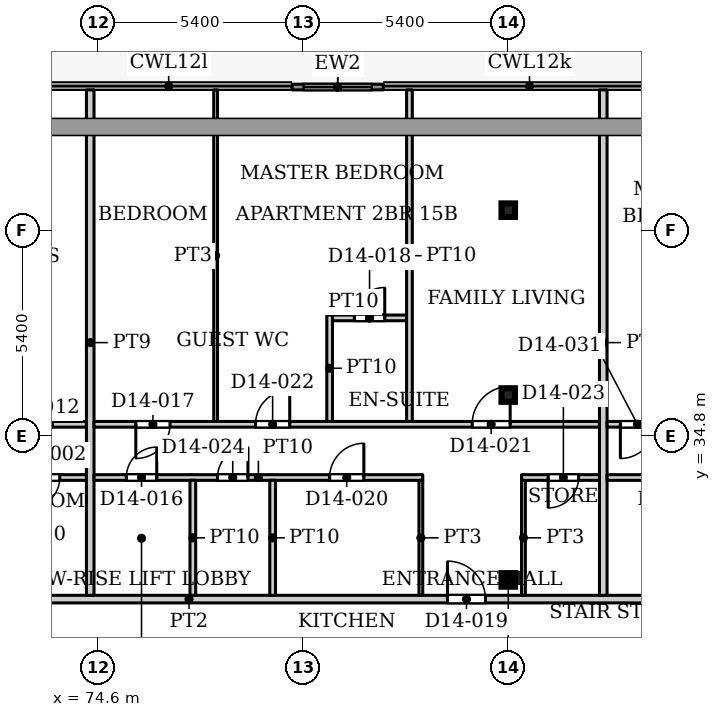
"""IFC4 building model, lengths in metres.
Left out: names, types, materials, properties, quantities, classifications, styles, units other than length and angle.
Written with IfcOpenShell. Run it as: python <this file> out.ifc"""

import sys

from ifc_helpers import new_model, si_unit, direction, frame, frame_2d, origin, origin_2d, place, context, subcontext, project, spatial, rectangle, hollow_rectangle, extrude, source, transform, mapped, element, fill, save


model = new_model("IFC4")
c1 = context("Model", 3, precision=1e-05, world=origin(), true_north=direction((0.0, 1.0)))
c2 = subcontext(c1, "Body", "Model", "MODEL_VIEW")
j1 = project(units=[si_unit("LENGTHUNIT", "METRE"), si_unit("PLANEANGLEUNIT", "RADIAN")], contexts=[c1])
p1 = place(None, origin())
s1 = spatial("IfcSite", under=j1, at=p1, CompositionType="ELEMENT")
p2 = place(p1, origin())
s2 = spatial("IfcBuilding", under=s1, at=p2, CompositionType="ELEMENT")
p3 = place(p2, frame((0.0, 0.0, 65.6)))
s3 = spatial("IfcBuildingStorey", under=s2, at=p3, CompositionType="ELEMENT", Elevation=65.6)
for number, where, z_axis, x_axis in (
    (1, (85.4, 31.005, 0.0), (0.0, 0.0, 1.0), (1.0, 0.0, 0.0)),
    (2, (85.4, 35.87, 0.0), (0.0, 0.0, 1.0), (1.0, 0.0, 0.0)),
    (3, (85.4, 40.735, 0.0), (0.0, 0.0, 1.0), (1.0, 0.0, 0.0)),
):
    element("IfcColumn", number, at=place(p3, frame(where, z_axis=z_axis, x_axis=x_axis)), inside=s3, PredefinedType="COLUMN", context=c2, shape_type="SweptSolid", body=[
        extrude(hollow_rectangle(XDim=0.356, YDim=0.356, WallThickness=0.016, InnerFilletRadius=0.016, OuterFilletRadius=0.032, at=origin_2d()), origin(), (0.0, 0.0, 1.0), 3.9),
    ])
p4 = place(p3, frame((79.712, 43.975, 0.0), z_axis=(0.0, 0.0, 1.0), x_axis=(1.0, 0.0, 0.0)))
e4 = element("IfcWall", 4, at=p4, inside=s3, PredefinedType="SOLIDWALL", context=c2, shape_type="SweptSolid", body=[
    extrude(rectangle(XDim=2.4, YDim=0.15, at=frame_2d((1.2, 0.0))), origin(), (0.0, 0.0, 1.0), 3.75),
])
p5 = place(p4, frame((0.3, 0.0, 0.0)))
e5 = element("IfcOpeningElement", 5, at=p5, cuts=e4, PredefinedType="OPENING", context=c2, shape_type="SweptSolid", body=[
    extrude(rectangle(XDim=1.8, YDim=2.4, at=frame_2d((0.9, 1.2))), frame((0.0, 0.085, 0.0), z_axis=(0.0, -1.0, 0.0), x_axis=(1.0, 0.0, 0.0)), (0.0, 0.0, 1.0), 0.17),
])
p6 = place(p3, frame((55.9, 30.5, 0.0), z_axis=(0.0, 0.0, 1.0), x_axis=(1.0, 0.0, 0.0)))
e6 = element("IfcWall", 6, at=p6, inside=s3, PredefinedType="PARTITIONING", context=c2, shape_type="SweptSolid", body=[
    extrude(rectangle(XDim=42.2, YDim=0.2, at=frame_2d((21.1, 0.0))), origin(), (0.0, 0.0, 1.0), 3.6),
])
p7 = place(p6, frame((14.7, 0.0, 0.0)))
e7 = element("IfcOpeningElement", 7, at=p7, cuts=e6, PredefinedType="OPENING", context=c2, shape_type="SweptSolid", body=[
    extrude(rectangle(XDim=1.0, YDim=2.1, at=frame_2d((0.5, 1.05))), frame((0.0, 0.11, 0.0), z_axis=(0.0, -1.0, 0.0), x_axis=(1.0, 0.0, 0.0)), (0.0, 0.0, 1.0), 0.22),
])
p8 = place(p6, frame((27.9, 0.0, 0.0)))
e8 = element("IfcOpeningElement", 8, at=p8, cuts=e6, PredefinedType="OPENING", context=c2, shape_type="SweptSolid", body=[
    extrude(rectangle(XDim=1.0, YDim=2.1, at=frame_2d((0.5, 1.05))), frame((0.0, 0.11, 0.0), z_axis=(0.0, -1.0, 0.0), x_axis=(1.0, 0.0, 0.0)), (0.0, 0.0, 1.0), 0.22),
])
p9 = place(p6, frame((39.0, 0.0, 0.0)))
e9 = element("IfcOpeningElement", 9, at=p9, cuts=e6, PredefinedType="OPENING", context=c2, shape_type="SweptSolid", body=[
    extrude(rectangle(XDim=1.0, YDim=2.1, at=frame_2d((0.5, 1.05))), frame((0.0, 0.11, 0.0), z_axis=(0.0, -1.0, 0.0), x_axis=(1.0, 0.0, 0.0)), (0.0, 0.0, 1.0), 0.22),
])
p10 = place(p3, frame((55.9, 35.1, 0.0), z_axis=(0.0, 0.0, 1.0), x_axis=(1.0, 0.0, 0.0)))
e10 = element("IfcWall", 10, at=p10, inside=s3, PredefinedType="PARTITIONING", context=c2, shape_type="SweptSolid", body=[
    extrude(rectangle(XDim=18.4, YDim=0.15, at=frame_2d((9.2, 0.0))), origin(), (0.0, 0.0, 1.0), 3.6),
])
p11 = place(p10, frame((1.25, 0.0, 0.0)))
e11 = element("IfcOpeningElement", 11, at=p11, cuts=e10, PredefinedType="OPENING", context=c2, shape_type="SweptSolid", body=[
    extrude(rectangle(XDim=0.9, YDim=2.1, at=frame_2d((0.45, 1.05))), frame((0.0, 0.085, 0.0), z_axis=(0.0, -1.0, 0.0), x_axis=(1.0, 0.0, 0.0)), (0.0, 0.0, 1.0), 0.17),
])
p12 = place(p10, frame((9.2, 0.0, 0.0)))
e12 = element("IfcOpeningElement", 12, at=p12, cuts=e10, PredefinedType="OPENING", context=c2, shape_type="SweptSolid", body=[
    extrude(rectangle(XDim=0.9, YDim=2.1, at=frame_2d((0.45, 1.05))), frame((0.0, 0.085, 0.0), z_axis=(0.0, -1.0, 0.0), x_axis=(1.0, 0.0, 0.0)), (0.0, 0.0, 1.0), 0.17),
])
p13 = place(p10, frame((12.35, 0.0, 0.0)))
e13 = element("IfcOpeningElement", 13, at=p13, cuts=e10, PredefinedType="OPENING", context=c2, shape_type="SweptSolid", body=[
    extrude(rectangle(XDim=1.0, YDim=2.1, at=frame_2d((0.5, 1.05))), frame((0.0, 0.085, 0.0), z_axis=(0.0, -1.0, 0.0), x_axis=(1.0, 0.0, 0.0)), (0.0, 0.0, 1.0), 0.17),
])
p14 = place(p10, frame((15.9, 0.0, 0.0)))
e14 = element("IfcOpeningElement", 14, at=p14, cuts=e10, PredefinedType="OPENING", context=c2, shape_type="SweptSolid", body=[
    extrude(rectangle(XDim=1.6, YDim=2.1, at=frame_2d((0.8, 1.05))), frame((0.0, 0.085, 0.0), z_axis=(0.0, -1.0, 0.0), x_axis=(1.0, 0.0, 0.0)), (0.0, 0.0, 1.0), 0.17),
])
p15 = place(p10, frame((4.4, 0.0, 0.0)))
e15 = element("IfcOpeningElement", 15, at=p15, cuts=e10, PredefinedType="OPENING", context=c2, shape_type="SweptSolid", body=[
    extrude(rectangle(XDim=0.9, YDim=2.1, at=frame_2d((0.45, 1.05))), frame((0.0, 0.085, 0.0), z_axis=(0.0, -1.0, 0.0), x_axis=(1.0, 0.0, 0.0)), (0.0, 0.0, 1.0), 0.17),
])
p16 = place(p3, frame((72.075, 33.7, 0.0), z_axis=(0.0, 0.0, 1.0), x_axis=(1.0, 0.0, 0.0)))
e16 = element("IfcWall", 16, at=p16, inside=s3, PredefinedType="PARTITIONING", context=c2, shape_type="SweptSolid", body=[
    extrude(rectangle(XDim=2.225, YDim=0.15, at=frame_2d((1.113, 0.0))), origin(), (0.0, 0.0, 1.0), 3.6),
])
p17 = place(p16, frame((0.725, 0.0, 0.0)))
e17 = element("IfcOpeningElement", 17, at=p17, cuts=e16, PredefinedType="OPENING", context=c2, shape_type="SweptSolid", body=[
    extrude(rectangle(XDim=0.8, YDim=2.1, at=frame_2d((0.4, 1.05))), frame((0.0, 0.085, 0.0), z_axis=(0.0, -1.0, 0.0), x_axis=(1.0, 0.0, 0.0)), (0.0, 0.0, 1.0), 0.17),
])
p18 = place(p3, frame((74.4, 30.6, 0.0), z_axis=(0.0, 0.0, 1.0), x_axis=(0.0, 1.0, 0.0)))
e18 = element("IfcWall", 18, at=p18, inside=s3, PredefinedType="PARTITIONING", context=c2, shape_type="SweptSolid", body=[
    extrude(rectangle(XDim=13.3, YDim=0.2, at=frame_2d((6.65, 0.0))), origin(), (0.0, 0.0, 1.0), 3.6),
])
p19 = place(p3, frame((74.5, 33.7, 0.0), z_axis=(0.0, 0.0, 1.0), x_axis=(1.0, 0.0, 0.0)))
e19 = element("IfcWall", 19, at=p19, inside=s3, PredefinedType="PARTITIONING", context=c2, shape_type="SweptSolid", body=[
    extrude(rectangle(XDim=8.65, YDim=0.15, at=frame_2d((4.325, 0.0))), origin(), (0.0, 0.0, 1.0), 3.6),
])
p20 = place(p19, frame((0.85, 0.0, 0.0)))
e20 = element("IfcOpeningElement", 20, at=p20, cuts=e19, PredefinedType="OPENING", context=c2, shape_type="SweptSolid", body=[
    extrude(rectangle(XDim=0.8, YDim=2.1, at=frame_2d((0.4, 1.05))), frame((0.0, 0.085, 0.0), z_axis=(0.0, -1.0, 0.0), x_axis=(1.0, 0.0, 0.0)), (0.0, 0.0, 1.0), 0.17),
])
p21 = place(p19, frame((6.2, 0.0, 0.0)))
e21 = element("IfcOpeningElement", 21, at=p21, cuts=e19, PredefinedType="OPENING", context=c2, shape_type="SweptSolid", body=[
    extrude(rectangle(XDim=0.9, YDim=2.1, at=frame_2d((0.45, 1.05))), frame((0.0, 0.085, 0.0), z_axis=(0.0, -1.0, 0.0), x_axis=(1.0, 0.0, 0.0)), (0.0, 0.0, 1.0), 0.17),
])
p22 = place(p19, frame((3.25, 0.0, 0.0)))
e22 = element("IfcOpeningElement", 22, at=p22, cuts=e19, PredefinedType="OPENING", context=c2, shape_type="SweptSolid", body=[
    extrude(rectangle(XDim=0.8, YDim=2.1, at=frame_2d((0.4, 1.05))), frame((0.0, 0.085, 0.0), z_axis=(0.0, -1.0, 0.0), x_axis=(1.0, 0.0, 0.0)), (0.0, 0.0, 1.0), 0.17),
])
p23 = place(p3, frame((74.5, 35.1, 0.0), z_axis=(0.0, 0.0, 1.0), x_axis=(1.0, 0.0, 0.0)))
e23 = element("IfcWall", 23, at=p23, inside=s3, PredefinedType="PARTITIONING", context=c2, shape_type="SweptSolid", body=[
    extrude(rectangle(XDim=13.3, YDim=0.15, at=frame_2d((6.65, 0.0))), origin(), (0.0, 0.0, 1.0), 3.6),
])
p24 = place(p23, frame((1.1, 0.0, 0.0)))
e24 = element("IfcOpeningElement", 24, at=p24, cuts=e23, PredefinedType="OPENING", context=c2, shape_type="SweptSolid", body=[
    extrude(rectangle(XDim=0.9, YDim=2.1, at=frame_2d((0.45, 1.05))), frame((0.0, 0.085, 0.0), z_axis=(0.0, -1.0, 0.0), x_axis=(1.0, 0.0, 0.0)), (0.0, 0.0, 1.0), 0.17),
])
p25 = place(p23, frame((9.95, 0.0, 0.0)))
e25 = element("IfcOpeningElement", 25, at=p25, cuts=e23, PredefinedType="OPENING", context=c2, shape_type="SweptSolid", body=[
    extrude(rectangle(XDim=1.0, YDim=2.1, at=frame_2d((0.5, 1.05))), frame((0.0, 0.085, 0.0), z_axis=(0.0, -1.0, 0.0), x_axis=(1.0, 0.0, 0.0)), (0.0, 0.0, 1.0), 0.17),
])
p26 = place(p23, frame((4.25, 0.0, 0.0)))
e26 = element("IfcOpeningElement", 26, at=p26, cuts=e23, PredefinedType="OPENING", context=c2, shape_type="SweptSolid", body=[
    extrude(rectangle(XDim=0.9, YDim=2.1, at=frame_2d((0.45, 1.05))), frame((0.0, 0.085, 0.0), z_axis=(0.0, -1.0, 0.0), x_axis=(1.0, 0.0, 0.0)), (0.0, 0.0, 1.0), 0.17),
])
p27 = place(p3, frame((77.1, 30.6, 0.0), z_axis=(0.0, 0.0, 1.0), x_axis=(0.0, 1.0, 0.0)))
e27 = element("IfcWall", 27, at=p27, inside=s3, PredefinedType="PARTITIONING", context=c2, shape_type="SweptSolid", body=[
    extrude(rectangle(XDim=3.025, YDim=0.15, at=frame_2d((1.512, 0.0))), origin(), (0.0, 0.0, 1.0), 3.6),
])
p28 = place(p3, frame((77.7, 35.175, 0.0), z_axis=(0.0, 0.0, 1.0), x_axis=(0.0, 1.0, 0.0)))
e28 = element("IfcWall", 28, at=p28, inside=s3, PredefinedType="PARTITIONING", context=c2, shape_type="SweptSolid", body=[
    extrude(rectangle(XDim=8.725, YDim=0.1, at=frame_2d((4.362, 0.0))), origin(), (0.0, 0.0, 1.0), 3.6),
])
p29 = place(p3, frame((79.2, 30.6, 0.0), z_axis=(0.0, 0.0, 1.0), x_axis=(0.0, 1.0, 0.0)))
e29 = element("IfcWall", 29, at=p29, inside=s3, PredefinedType="PARTITIONING", context=c2, shape_type="SweptSolid", body=[
    extrude(rectangle(XDim=3.025, YDim=0.15, at=frame_2d((1.512, 0.0))), origin(), (0.0, 0.0, 1.0), 3.6),
])
p30 = place(p3, frame((80.7, 35.175, 0.0), z_axis=(0.0, 0.0, 1.0), x_axis=(0.0, 1.0, 0.0)))
e30 = element("IfcWall", 30, at=p30, inside=s3, PredefinedType="PARTITIONING", context=c2, shape_type="SweptSolid", body=[
    extrude(rectangle(XDim=2.8, YDim=0.15, at=frame_2d((1.4, 0.0))), origin(), (0.0, 0.0, 1.0), 3.6),
])
p31 = place(p3, frame((80.775, 37.9, 0.0), z_axis=(0.0, 0.0, 1.0), x_axis=(1.0, 0.0, 0.0)))
e31 = element("IfcWall", 31, at=p31, inside=s3, PredefinedType="PARTITIONING", context=c2, shape_type="SweptSolid", body=[
    extrude(rectangle(XDim=1.95, YDim=0.15, at=frame_2d((0.975, 0.0))), origin(), (0.0, 0.0, 1.0), 3.6),
])
p32 = place(p31, frame((0.575, 0.0, 0.0)))
e32 = element("IfcOpeningElement", 32, at=p32, cuts=e31, PredefinedType="OPENING", context=c2, shape_type="SweptSolid", body=[
    extrude(rectangle(XDim=0.8, YDim=2.1, at=frame_2d((0.4, 1.05))), frame((0.0, 0.085, 0.0), z_axis=(0.0, -1.0, 0.0), x_axis=(1.0, 0.0, 0.0)), (0.0, 0.0, 1.0), 0.17),
])
p33 = place(p3, frame((82.8, 35.175, 0.0), z_axis=(0.0, 0.0, 1.0), x_axis=(0.0, 1.0, 0.0)))
e33 = element("IfcWall", 33, at=p33, inside=s3, PredefinedType="PARTITIONING", context=c2, shape_type="SweptSolid", body=[
    extrude(rectangle(XDim=8.725, YDim=0.15, at=frame_2d((4.362, 0.0))), origin(), (0.0, 0.0, 1.0), 3.6),
])
p34 = place(p3, frame((83.1, 30.6, 0.0), z_axis=(0.0, 0.0, 1.0), x_axis=(0.0, 1.0, 0.0)))
e34 = element("IfcWall", 34, at=p34, inside=s3, PredefinedType="PARTITIONING", context=c2, shape_type="SweptSolid", body=[
    extrude(rectangle(XDim=3.025, YDim=0.1, at=frame_2d((1.512, 0.0))), origin(), (0.0, 0.0, 1.0), 3.6),
])
p35 = place(p3, frame((85.75, 33.7, 0.0), z_axis=(0.0, 0.0, 1.0), x_axis=(1.0, 0.0, 0.0)))
e35 = element("IfcWall", 35, at=p35, inside=s3, PredefinedType="PARTITIONING", context=c2, shape_type="SweptSolid", body=[
    extrude(rectangle(XDim=2.05, YDim=0.15, at=frame_2d((1.025, 0.0))), origin(), (0.0, 0.0, 1.0), 3.6),
])
p36 = place(p35, frame((0.7, 0.0, 0.0)))
e36 = element("IfcOpeningElement", 36, at=p36, cuts=e35, PredefinedType="OPENING", context=c2, shape_type="SweptSolid", body=[
    extrude(rectangle(XDim=0.8, YDim=2.1, at=frame_2d((0.4, 1.05))), frame((0.0, 0.085, 0.0), z_axis=(0.0, -1.0, 0.0), x_axis=(1.0, 0.0, 0.0)), (0.0, 0.0, 1.0), 0.17),
])
p37 = place(p3, frame((85.8, 30.6, 0.0), z_axis=(0.0, 0.0, 1.0), x_axis=(0.0, 1.0, 0.0)))
e37 = element("IfcWall", 37, at=p37, inside=s3, PredefinedType="PARTITIONING", context=c2, shape_type="SweptSolid", body=[
    extrude(rectangle(XDim=3.025, YDim=0.1, at=frame_2d((1.512, 0.0))), origin(), (0.0, 0.0, 1.0), 3.6),
])
p38 = place(p3, frame((87.9, 30.6, 0.0), z_axis=(0.0, 0.0, 1.0), x_axis=(0.0, 1.0, 0.0)))
e38 = element("IfcWall", 38, at=p38, inside=s3, PredefinedType="PARTITIONING", context=c2, shape_type="SweptSolid", body=[
    extrude(rectangle(XDim=13.3, YDim=0.2, at=frame_2d((6.65, 0.0))), origin(), (0.0, 0.0, 1.0), 3.6),
])
p39 = place(p3, frame((88.0, 33.7, 0.0), z_axis=(0.0, 0.0, 1.0), x_axis=(1.0, 0.0, 0.0)))
e39 = element("IfcWall", 39, at=p39, inside=s3, PredefinedType="PARTITIONING", context=c2, shape_type="SweptSolid", body=[
    extrude(rectangle(XDim=6.275, YDim=0.15, at=frame_2d((3.137, 0.0))), origin(), (0.0, 0.0, 1.0), 3.6),
])
p40 = place(p39, frame((1.45, 0.0, 0.0)))
e40 = element("IfcOpeningElement", 40, at=p40, cuts=e39, PredefinedType="OPENING", context=c2, shape_type="SweptSolid", body=[
    extrude(rectangle(XDim=0.9, YDim=2.1, at=frame_2d((0.45, 1.05))), frame((0.0, 0.085, 0.0), z_axis=(0.0, -1.0, 0.0), x_axis=(1.0, 0.0, 0.0)), (0.0, 0.0, 1.0), 0.17),
])
p41 = place(p39, frame((4.75, 0.0, 0.0)))
e41 = element("IfcOpeningElement", 41, at=p41, cuts=e39, PredefinedType="OPENING", context=c2, shape_type="SweptSolid", body=[
    extrude(rectangle(XDim=0.8, YDim=2.1, at=frame_2d((0.4, 1.05))), frame((0.0, 0.085, 0.0), z_axis=(0.0, -1.0, 0.0), x_axis=(1.0, 0.0, 0.0)), (0.0, 0.0, 1.0), 0.17),
])
p42 = place(p3, frame((88.0, 35.1, 0.0), z_axis=(0.0, 0.0, 1.0), x_axis=(1.0, 0.0, 0.0)))
e42 = element("IfcWall", 42, at=p42, inside=s3, PredefinedType="PARTITIONING", context=c2, shape_type="SweptSolid", body=[
    extrude(rectangle(XDim=11.9, YDim=0.15, at=frame_2d((5.95, 0.0))), origin(), (0.0, 0.0, 1.0), 3.6),
])
p43 = place(p42, frame((9.65, 0.0, 0.0)))
e43 = element("IfcOpeningElement", 43, at=p43, cuts=e42, PredefinedType="OPENING", context=c2, shape_type="SweptSolid", body=[
    extrude(rectangle(XDim=0.9, YDim=2.1, at=frame_2d((0.45, 1.05))), frame((0.0, 0.085, 0.0), z_axis=(0.0, -1.0, 0.0), x_axis=(1.0, 0.0, 0.0)), (0.0, 0.0, 1.0), 0.17),
])
p44 = place(p42, frame((5.55, 0.0, 0.0)))
e44 = element("IfcOpeningElement", 44, at=p44, cuts=e42, PredefinedType="OPENING", context=c2, shape_type="SweptSolid", body=[
    extrude(rectangle(XDim=1.0, YDim=2.1, at=frame_2d((0.5, 1.05))), frame((0.0, 0.085, 0.0), z_axis=(0.0, -1.0, 0.0), x_axis=(1.0, 0.0, 0.0)), (0.0, 0.0, 1.0), 0.17),
])
p45 = place(p42, frame((0.35, 0.0, 0.0)))
e45 = element("IfcOpeningElement", 45, at=p45, cuts=e42, PredefinedType="OPENING", context=c2, shape_type="SweptSolid", body=[
    extrude(rectangle(XDim=0.9, YDim=2.1, at=frame_2d((0.45, 1.05))), frame((0.0, 0.085, 0.0), z_axis=(0.0, -1.0, 0.0), x_axis=(1.0, 0.0, 0.0)), (0.0, 0.0, 1.0), 0.17),
])
m1 = source(origin(), c2, "Body", "SweptSolid", [
    extrude(rectangle(XDim=1.8, YDim=2.4, at=frame_2d((0.9, 1.2))), frame((0.0, 0.025, 0.0), z_axis=(0.0, -1.0, 0.0), x_axis=(1.0, 0.0, 0.0)), (0.0, 0.0, 1.0), 0.05),
])
p46 = place(p5, origin())
e46 = element("IfcDoor", 46, at=p46, inside=s3, OperationType="SLIDING_TO_LEFT", PredefinedType="DOOR", context=c2, shape_type="MappedRepresentation", body=[
    mapped(m1, transform((0.0, 0.0, 0.0), x_axis=(1.0, 0.0, 0.0), y_axis=(0.0, 1.0, 0.0), z_axis=(0.0, 0.0, 1.0), scale=1.0)),
])
fill(e5, e46)
m2 = source(origin(), c2, "Body", "SweptSolid", [
    extrude(rectangle(XDim=0.8, YDim=2.1, at=frame_2d((0.4, 1.05))), frame((0.0, 0.025, 0.0), z_axis=(0.0, -1.0, 0.0), x_axis=(1.0, 0.0, 0.0)), (0.0, 0.0, 1.0), 0.05),
])
p47 = place(p17, origin())
e47 = element("IfcDoor", 47, at=p47, inside=s3, OperationType="SINGLE_SWING_RIGHT", PredefinedType="DOOR", context=c2, shape_type="MappedRepresentation", body=[
    mapped(m2, transform((0.0, 0.0, 0.0), x_axis=(1.0, 0.0, 0.0), y_axis=(0.0, 1.0, 0.0), z_axis=(0.0, 0.0, 1.0), scale=1.0)),
])
fill(e17, e47)
p48 = place(p20, origin())
e48 = element("IfcDoor", 48, at=p48, inside=s3, OperationType="SINGLE_SWING_LEFT", PredefinedType="DOOR", context=c2, shape_type="MappedRepresentation", body=[
    mapped(m2, transform((0.0, 0.0, 0.0), x_axis=(1.0, 0.0, 0.0), y_axis=(0.0, 1.0, 0.0), z_axis=(0.0, 0.0, 1.0), scale=1.0)),
])
fill(e20, e48)
m3 = source(origin(), c2, "Body", "SweptSolid", [
    extrude(rectangle(XDim=0.9, YDim=2.1, at=frame_2d((0.45, 1.05))), frame((0.0, 0.025, 0.0), z_axis=(0.0, -1.0, 0.0), x_axis=(1.0, 0.0, 0.0)), (0.0, 0.0, 1.0), 0.05),
])
p49 = place(p24, origin())
e49 = element("IfcDoor", 49, at=p49, inside=s3, OperationType="SINGLE_SWING_RIGHT", PredefinedType="DOOR", context=c2, shape_type="MappedRepresentation", body=[
    mapped(m3, transform((0.0, 0.0, 0.0), x_axis=(1.0, 0.0, 0.0), y_axis=(0.0, 1.0, 0.0), z_axis=(0.0, 0.0, 1.0), scale=1.0)),
])
fill(e24, e49)
p50 = place(p32, origin())
e50 = element("IfcDoor", 50, at=p50, inside=s3, OperationType="SINGLE_SWING_LEFT", PredefinedType="DOOR", context=c2, shape_type="MappedRepresentation", body=[
    mapped(m2, transform((0.0, 0.0, 0.0), x_axis=(1.0, 0.0, 0.0), y_axis=(0.0, 1.0, 0.0), z_axis=(0.0, 0.0, 1.0), scale=1.0)),
])
fill(e32, e50)
m4 = source(origin(), c2, "Body", "SweptSolid", [
    extrude(rectangle(XDim=1.0, YDim=2.1, at=frame_2d((0.5, 1.05))), frame((0.0, 0.025, 0.0), z_axis=(0.0, -1.0, 0.0), x_axis=(1.0, 0.0, 0.0)), (0.0, 0.0, 1.0), 0.05),
])
p51 = place(p8, origin())
e51 = element("IfcDoor", 51, at=p51, inside=s3, OperationType="SINGLE_SWING_LEFT", PredefinedType="DOOR", context=c2, shape_type="MappedRepresentation", body=[
    mapped(m4, transform((0.0, 0.0, 0.0), x_axis=(1.0, 0.0, 0.0), y_axis=(0.0, 1.0, 0.0), z_axis=(0.0, 0.0, 1.0), scale=1.0)),
])
fill(e8, e51)
p52 = place(p21, origin())
e52 = element("IfcDoor", 52, at=p52, inside=s3, OperationType="SINGLE_SWING_LEFT", PredefinedType="DOOR", context=c2, shape_type="MappedRepresentation", body=[
    mapped(m3, transform((0.0, 0.0, 0.0), x_axis=(1.0, 0.0, 0.0), y_axis=(0.0, 1.0, 0.0), z_axis=(0.0, 0.0, 1.0), scale=1.0)),
])
fill(e21, e52)
m5 = source(origin(), c2, "Body", "SweptSolid", [
    extrude(rectangle(XDim=1.0, YDim=2.1, at=frame_2d((0.5, 1.05))), frame((0.0, 0.025, 0.0), z_axis=(0.0, -1.0, 0.0), x_axis=(1.0, 0.0, 0.0)), (0.0, 0.0, 1.0), 0.05),
])
p53 = place(p25, origin())
e53 = element("IfcDoor", 53, at=p53, inside=s3, OperationType="SINGLE_SWING_LEFT", PredefinedType="DOOR", context=c2, shape_type="MappedRepresentation", body=[
    mapped(m5, transform((0.0, 0.0, 0.0), x_axis=(1.0, 0.0, 0.0), y_axis=(0.0, 1.0, 0.0), z_axis=(0.0, 0.0, 1.0), scale=1.0)),
])
fill(e25, e53)
p54 = place(p26, origin())
e54 = element("IfcDoor", 54, at=p54, inside=s3, OperationType="SINGLE_SWING_LEFT", PredefinedType="DOOR", context=c2, shape_type="MappedRepresentation", body=[
    mapped(m3, transform((0.0, 0.0, 0.0), x_axis=(1.0, 0.0, 0.0), y_axis=(0.0, 1.0, 0.0), z_axis=(0.0, 0.0, 1.0), scale=1.0)),
])
fill(e26, e54)
p55 = place(p36, origin())
e55 = element("IfcDoor", 55, at=p55, inside=s3, OperationType="SINGLE_SWING_RIGHT", PredefinedType="DOOR", context=c2, shape_type="MappedRepresentation", body=[
    mapped(m2, transform((0.0, 0.0, 0.0), x_axis=(1.0, 0.0, 0.0), y_axis=(0.0, 1.0, 0.0), z_axis=(0.0, 0.0, 1.0), scale=1.0)),
])
fill(e36, e55)
p56 = place(p22, origin())
e56 = element("IfcDoor", 56, at=p56, inside=s3, OperationType="SINGLE_SWING_LEFT", PredefinedType="DOOR", context=c2, shape_type="MappedRepresentation", body=[
    mapped(m2, transform((0.0, 0.0, 0.0), x_axis=(1.0, 0.0, 0.0), y_axis=(0.0, 1.0, 0.0), z_axis=(0.0, 0.0, 1.0), scale=1.0)),
])
fill(e22, e56)
p57 = place(p45, origin())
e57 = element("IfcDoor", 57, at=p57, inside=s3, OperationType="SINGLE_SWING_RIGHT", PredefinedType="DOOR", context=c2, shape_type="MappedRepresentation", body=[
    mapped(m3, transform((0.0, 0.0, 0.0), x_axis=(1.0, 0.0, 0.0), y_axis=(0.0, 1.0, 0.0), z_axis=(0.0, 0.0, 1.0), scale=1.0)),
])
fill(e45, e57)
save(model, sys.argv[1])
